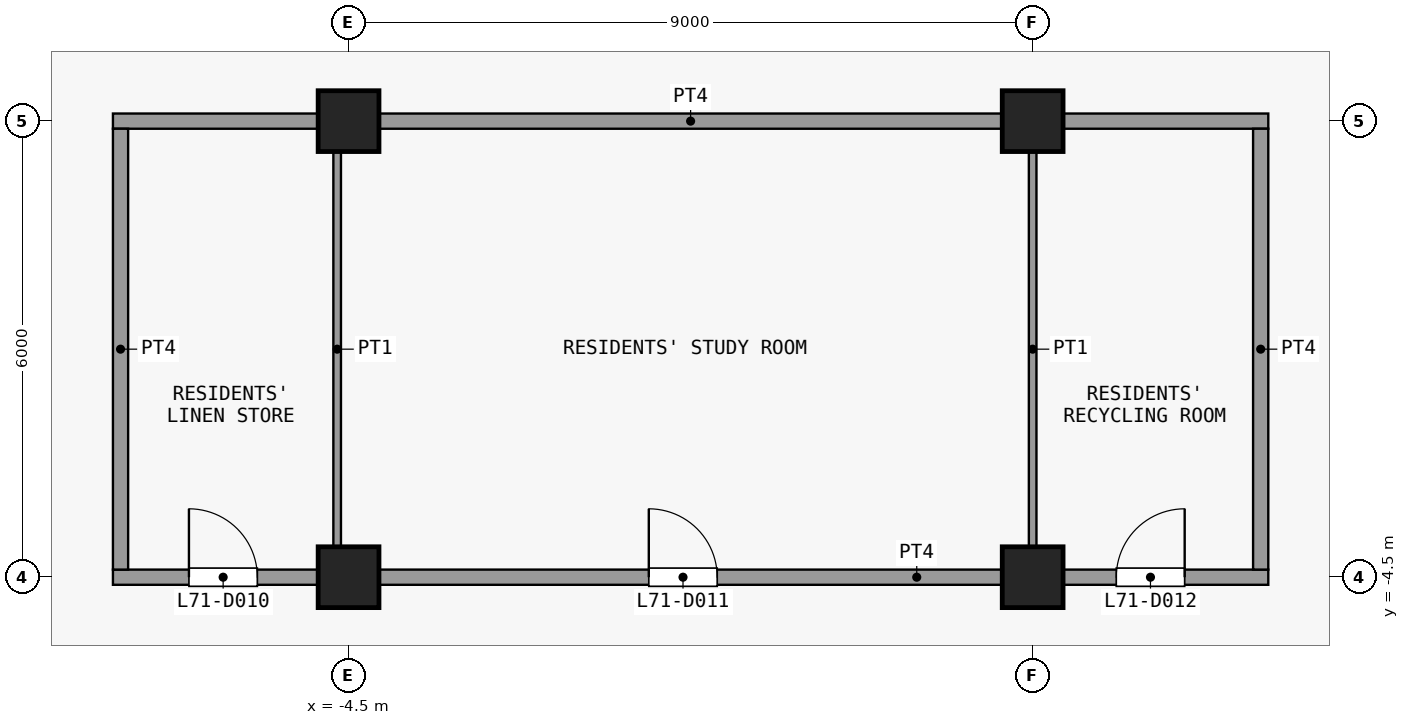
"""IFC4 building model, lengths in metres.
Left out: names, types, materials, properties, quantities, classifications, styles, units other than length and angle.
Written with IfcOpenShell. Run it as: python <this file> out.ifc"""

import sys

from ifc_helpers import new_model, si_unit, direction, frame, frame_2d, origin, origin_2d, place, context, subcontext, project, spatial, rectangle, extrude, element, fill, save


model = new_model("IFC4")
c1 = context("Model", 3, precision=1e-05, world=origin(), true_north=direction((0.0, 1.0)))
c2 = subcontext(c1, "Body", "Model", "MODEL_VIEW")
j1 = project(units=[si_unit("LENGTHUNIT", "METRE"), si_unit("PLANEANGLEUNIT", "RADIAN")], contexts=[c1])
p1 = place(None, origin())
s1 = spatial("IfcSite", under=j1, at=p1, CompositionType="ELEMENT")
p2 = place(p1, origin())
s2 = spatial("IfcBuilding", under=s1, at=p2, CompositionType="ELEMENT")
p3 = place(p2, frame((0.0, 0.0, 280.7)))
s3 = spatial("IfcBuildingStorey", under=s2, at=p3, CompositionType="ELEMENT", Elevation=280.7)
for number, where, z_axis, x_axis in (
    (1, (-4.5, -4.5, 0.0), (0.0, 0.0, 1.0), (1.0, 0.0, 0.0)),
    (2, (-4.5, 1.5, 0.0), (0.0, 0.0, 1.0), (1.0, 0.0, 0.0)),
    (3, (4.5, -4.5, 0.0), (0.0, 0.0, 1.0), (1.0, 0.0, 0.0)),
    (4, (4.5, 1.5, 0.0), (0.0, 0.0, 1.0), (1.0, 0.0, 0.0)),
):
    element("IfcColumn", number, at=place(p3, frame(where, z_axis=z_axis, x_axis=x_axis)), inside=s3, PredefinedType="COLUMN", context=c2, shape_type="SweptSolid", body=[
        extrude(rectangle(XDim=0.8, YDim=0.8, at=origin_2d()), origin(), (0.0, 0.0, 1.0), 3.6),
    ])
p4 = place(p3, frame((-7.6, -4.5, 0.0), z_axis=(0.0, 0.0, 1.0), x_axis=(1.0, 0.0, 0.0)))
e5 = element("IfcWall", 5, at=p4, inside=s3, PredefinedType="PARTITIONING", context=c2, shape_type="SweptSolid", body=[
    extrude(rectangle(XDim=15.2, YDim=0.2, at=frame_2d((7.6, 0.0))), origin(), (0.0, 0.0, 1.0), 3.3),
])
p5 = place(p4, frame((1.0, 0.0, 0.0)))
e6 = element("IfcOpeningElement", 6, at=p5, cuts=e5, PredefinedType="OPENING", context=c2, shape_type="SweptSolid", body=[
    extrude(rectangle(XDim=0.9, YDim=2.1, at=frame_2d((0.45, 1.05))), frame((0.0, 0.11, 0.0), z_axis=(0.0, -1.0, 0.0), x_axis=(1.0, 0.0, 0.0)), (0.0, 0.0, 1.0), 0.22),
])
p6 = place(p4, frame((7.05, 0.0, 0.0)))
e7 = element("IfcOpeningElement", 7, at=p6, cuts=e5, PredefinedType="OPENING", context=c2, shape_type="SweptSolid", body=[
    extrude(rectangle(XDim=0.9, YDim=2.1, at=frame_2d((0.45, 1.05))), frame((0.0, 0.11, 0.0), z_axis=(0.0, -1.0, 0.0), x_axis=(1.0, 0.0, 0.0)), (0.0, 0.0, 1.0), 0.22),
])
p7 = place(p4, frame((13.2, 0.0, 0.0)))
e8 = element("IfcOpeningElement", 8, at=p7, cuts=e5, PredefinedType="OPENING", context=c2, shape_type="SweptSolid", body=[
    extrude(rectangle(XDim=0.9, YDim=2.1, at=frame_2d((0.45, 1.05))), frame((0.0, 0.11, 0.0), z_axis=(0.0, -1.0, 0.0), x_axis=(1.0, 0.0, 0.0)), (0.0, 0.0, 1.0), 0.22),
])
p8 = place(p3, frame((-7.6, 1.5, 0.0), z_axis=(0.0, 0.0, 1.0), x_axis=(1.0, 0.0, 0.0)))
e9 = element("IfcWall", 9, at=p8, inside=s3, PredefinedType="PARTITIONING", context=c2, shape_type="SweptSolid", body=[
    extrude(rectangle(XDim=15.2, YDim=0.2, at=frame_2d((7.6, 0.0))), origin(), (0.0, 0.0, 1.0), 3.3),
])
p9 = place(p3, frame((-7.5, -4.4, 0.0), z_axis=(0.0, 0.0, 1.0), x_axis=(0.0, 1.0, 0.0)))
e10 = element("IfcWall", 10, at=p9, inside=s3, PredefinedType="PARTITIONING", context=c2, shape_type="SweptSolid", body=[
    extrude(rectangle(XDim=5.8, YDim=0.2, at=frame_2d((2.9, 0.0))), origin(), (0.0, 0.0, 1.0), 3.3),
])
for number, where, z_axis, x_axis in (
    (11, (-4.65, -4.4, 0.0), (0.0, 0.0, 1.0), (0.0, 1.0, 0.0)),
    (12, (4.5, -4.4, 0.0), (0.0, 0.0, 1.0), (0.0, 1.0, 0.0)),
):
    element("IfcWall", number, at=place(p3, frame(where, z_axis=z_axis, x_axis=x_axis)), inside=s3, PredefinedType="PARTITIONING", context=c2, shape_type="SweptSolid", body=[
        extrude(rectangle(XDim=5.8, YDim=0.1, at=frame_2d((2.9, 0.0))), origin(), (0.0, 0.0, 1.0), 3.3),
    ])
p10 = place(p3, frame((7.5, -4.4, 0.0), z_axis=(0.0, 0.0, 1.0), x_axis=(0.0, 1.0, 0.0)))
e13 = element("IfcWall", 13, at=p10, inside=s3, PredefinedType="PARTITIONING", context=c2, shape_type="SweptSolid", body=[
    extrude(rectangle(XDim=5.8, YDim=0.2, at=frame_2d((2.9, 0.0))), origin(), (0.0, 0.0, 1.0), 3.3),
])
p11 = place(p5, origin())
e14 = element("IfcDoor", 14, at=p11, inside=s3, OperationType="SINGLE_SWING_RIGHT", PredefinedType="DOOR", context=c2, shape_type="SweptSolid", body=[
    extrude(rectangle(XDim=0.9, YDim=2.1, at=frame_2d((0.45, 1.05))), frame((0.0, 0.025, 0.0), z_axis=(0.0, -1.0, 0.0), x_axis=(1.0, 0.0, 0.0)), (0.0, 0.0, 1.0), 0.05),
])
fill(e6, e14)
p12 = place(p6, origin())
e15 = element("IfcDoor", 15, at=p12, inside=s3, OperationType="SINGLE_SWING_RIGHT", PredefinedType="DOOR", context=c2, shape_type="SweptSolid", body=[
    extrude(rectangle(XDim=0.9, YDim=2.1, at=frame_2d((0.45, 1.05))), frame((0.0, 0.025, 0.0), z_axis=(0.0, -1.0, 0.0), x_axis=(1.0, 0.0, 0.0)), (0.0, 0.0, 1.0), 0.05),
])
fill(e7, e15)
p13 = place(p7, origin())
e16 = element("IfcDoor", 16, at=p13, inside=s3, OperationType="SINGLE_SWING_LEFT", PredefinedType="DOOR", context=c2, shape_type="SweptSolid", body=[
    extrude(rectangle(XDim=0.9, YDim=2.1, at=frame_2d((0.45, 1.05))), frame((0.0, 0.025, 0.0), z_axis=(0.0, -1.0, 0.0), x_axis=(1.0, 0.0, 0.0)), (0.0, 0.0, 1.0), 0.05),
])
fill(e8, e16)
save(model, sys.argv[1])
